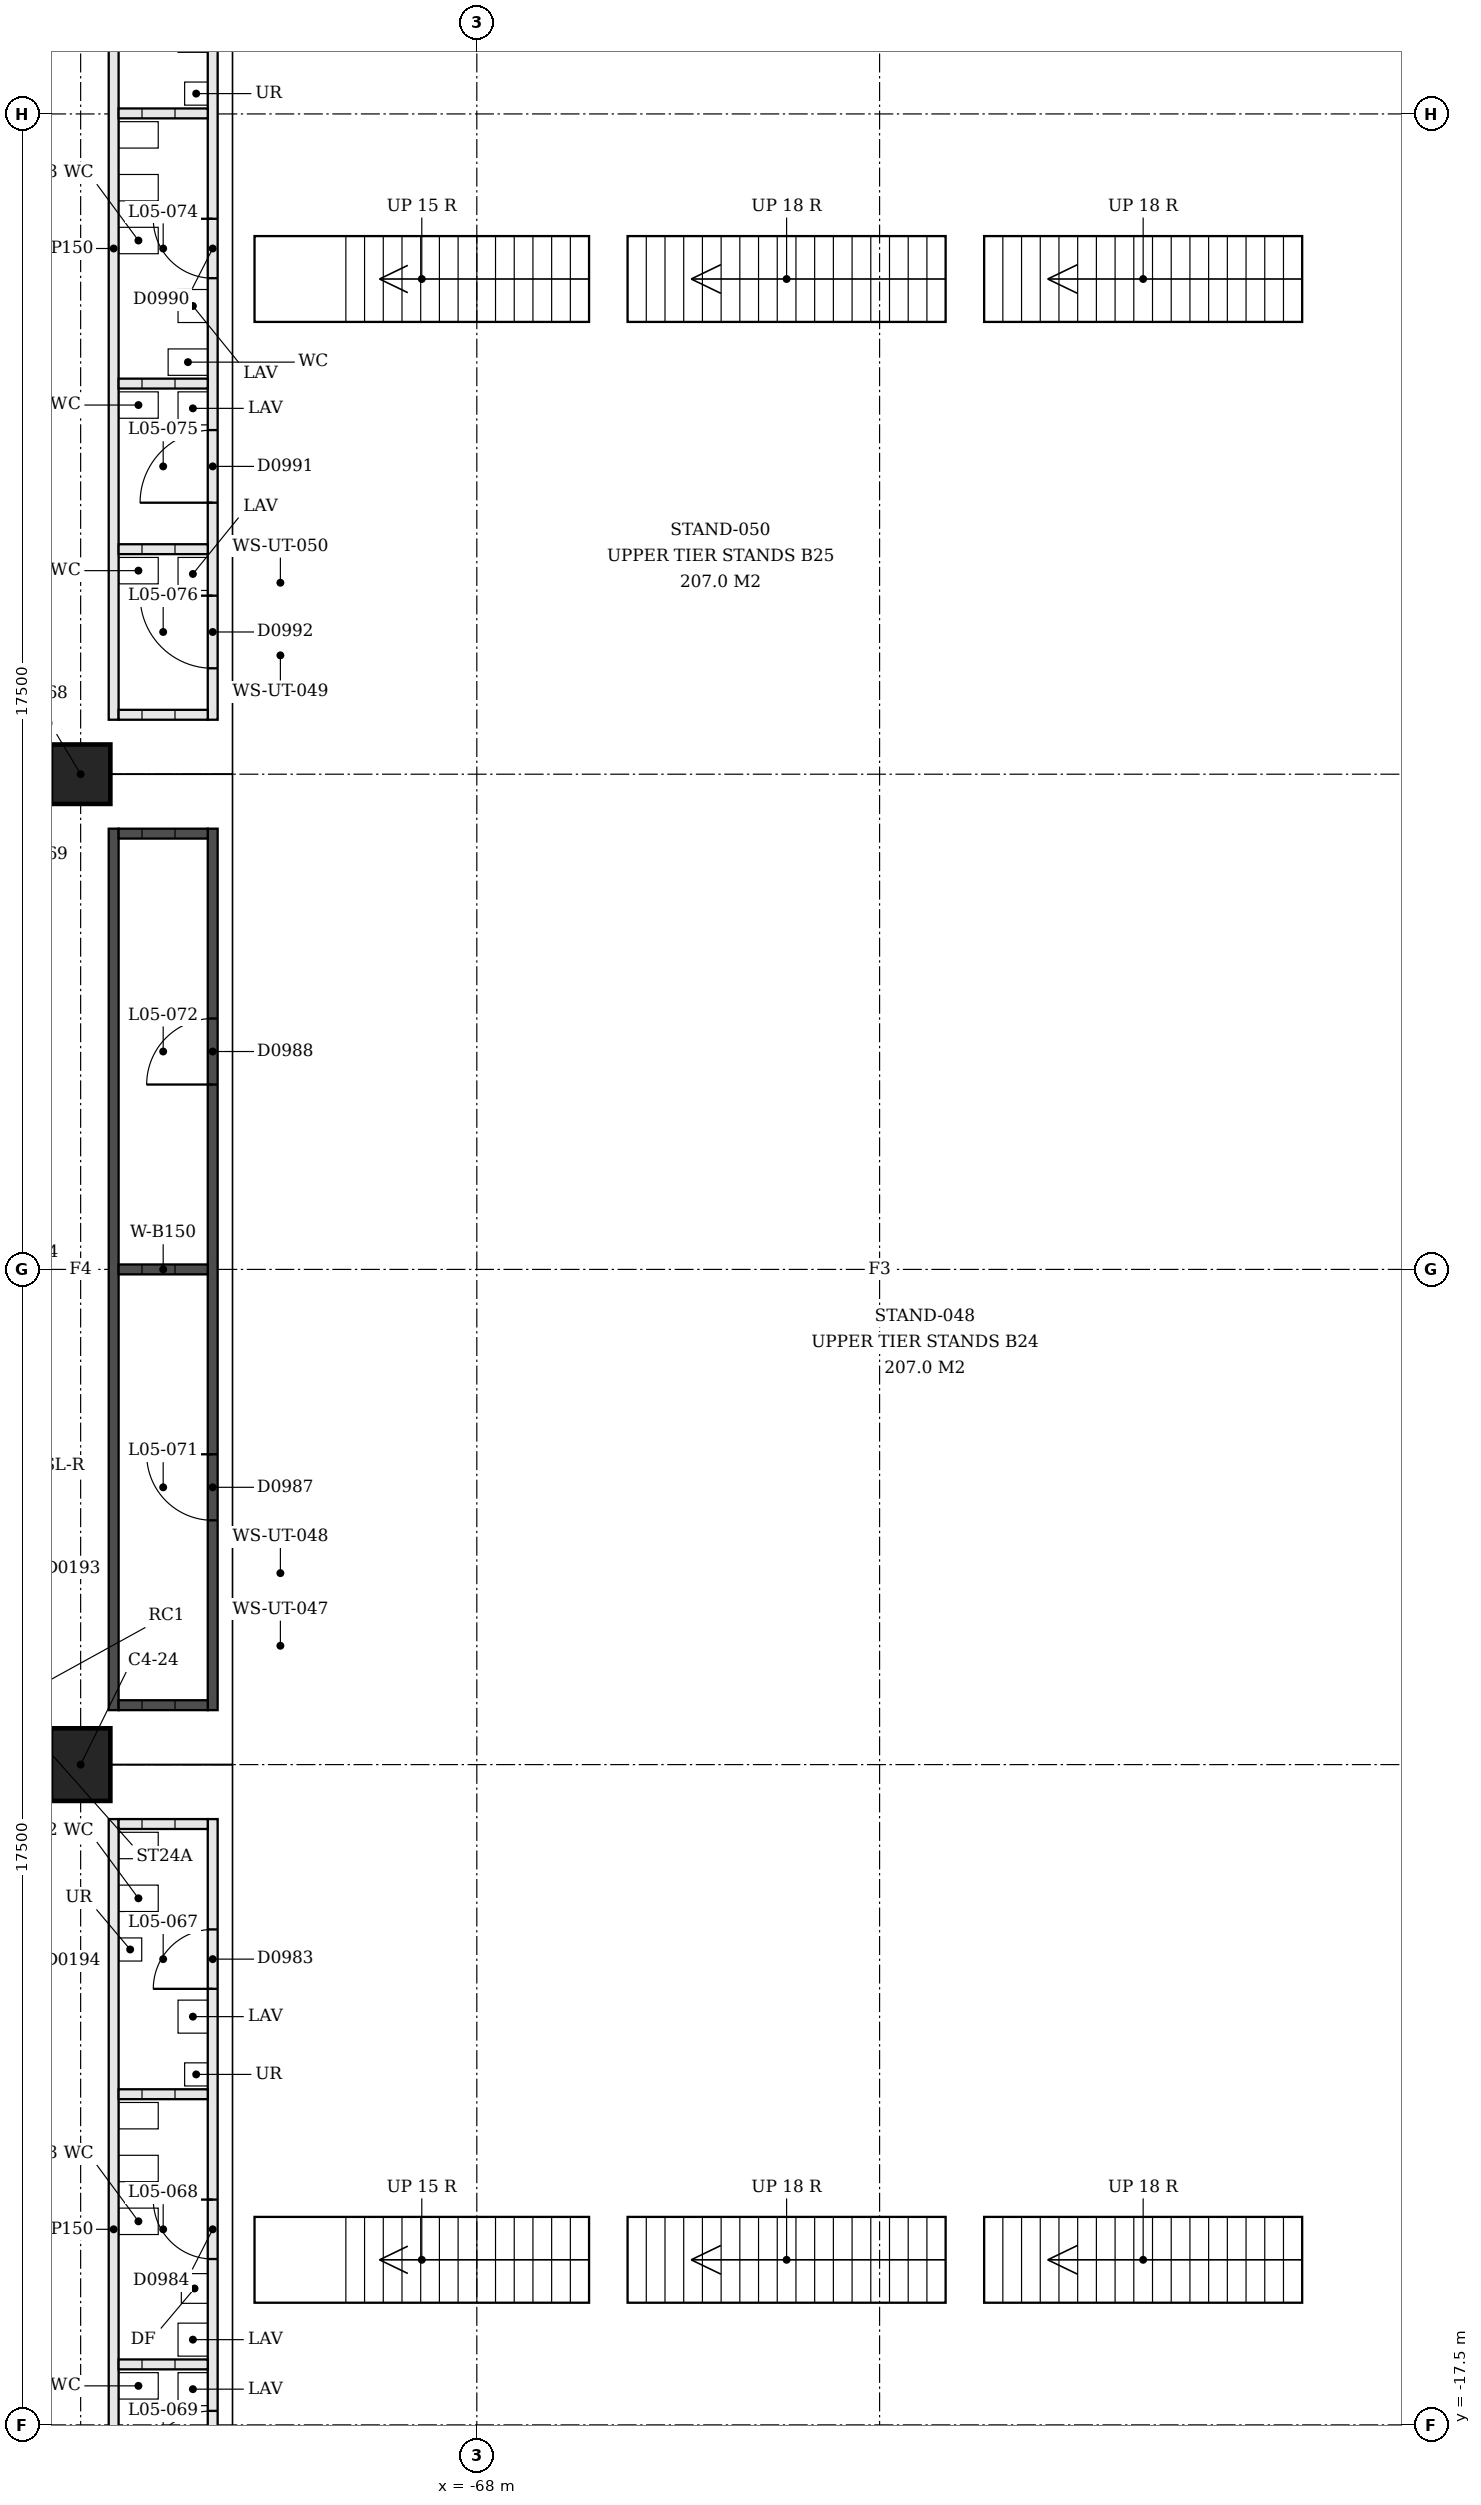
"""IFC4 building model, lengths in metres.
Left out: names, types, materials, properties, quantities, classifications, styles, units other than length and angle.
Written with IfcOpenShell. Run it as: python <this file> out.ifc"""

import sys

from ifc_helpers import new_model, si_unit, direction, frame, frame_2d, origin, origin_2d, place, context, subcontext, project, spatial, rectangle, extrude, element, fill, save


model = new_model("IFC4")
c1 = context("Model", 3, precision=1e-05, world=origin(), true_north=direction((0.0, 1.0)))
c2 = subcontext(c1, "Body", "Model", "MODEL_VIEW")
j1 = project(units=[si_unit("LENGTHUNIT", "METRE"), si_unit("PLANEANGLEUNIT", "RADIAN")], contexts=[c1])
p1 = place(None, origin())
s1 = spatial("IfcSite", under=j1, at=p1, CompositionType="ELEMENT")
p2 = place(p1, origin())
s2 = spatial("IfcBuilding", under=s1, at=p2, CompositionType="ELEMENT")
p3 = place(p2, frame((0.0, 0.0, 22.5)))
s3 = spatial("IfcBuildingStorey", under=s2, at=p3, CompositionType="ELEMENT", Elevation=22.5)
p4 = place(p3, frame((-74.0, -7.5, 0.0), z_axis=(0.0, 0.0, 1.0), x_axis=(0.0, -1.0, 0.0)))
e1 = element("IfcColumn", 1, at=p4, inside=s3, PredefinedType="COLUMN", context=c2, shape_type="SweptSolid", body=[
    extrude(rectangle(XDim=1.1, YDim=0.9, at=origin_2d()), origin(), (0.0, 0.0, 1.0), 6.5),
])
p5 = place(p3, frame((-74.0, 7.5, 0.0), z_axis=(0.0, 0.0, 1.0), x_axis=(0.0, -1.0, 0.0)))
e2 = element("IfcColumn", 2, at=p5, inside=s3, PredefinedType="COLUMN", context=c2, shape_type="SweptSolid", body=[
    extrude(rectangle(XDim=0.9, YDim=0.9, at=origin_2d()), origin(), (0.0, 0.0, 1.0), 6.5),
])
p6 = place(p3, frame((-72.0, -8.325, 0.0), z_axis=(0.0, 0.0, 1.0), x_axis=(0.0, -1.0, 0.0)))
e3 = element("IfcWall", 3, at=p6, inside=s3, PredefinedType="PARTITIONING", context=c2, shape_type="SweptSolid", body=[
    extrude(rectangle(XDim=13.35, YDim=0.15, at=frame_2d((6.675, 0.0))), origin(), (0.0, 0.0, 1.0), 3.0),
])
p7 = place(p6, frame((1.671, 0.0, 0.0)))
e4 = element("IfcOpeningElement", 4, at=p7, cuts=e3, PredefinedType="OPENING", context=c2, shape_type="SweptSolid", body=[
    extrude(rectangle(XDim=0.9, YDim=2.1, at=frame_2d((0.45, 1.05))), frame((0.0, 0.075, 0.0), z_axis=(0.0, -1.0, 0.0), x_axis=(1.0, 0.0, 0.0)), (0.0, 0.0, 1.0), 0.15),
])
p8 = place(p6, frame((5.763, 0.0, 0.0)))
e5 = element("IfcOpeningElement", 5, at=p8, cuts=e3, PredefinedType="OPENING", context=c2, shape_type="SweptSolid", body=[
    extrude(rectangle(XDim=0.9, YDim=2.1, at=frame_2d((0.45, 1.05))), frame((0.0, 0.075, 0.0), z_axis=(0.0, -1.0, 0.0), x_axis=(1.0, 0.0, 0.0)), (0.0, 0.0, 1.0), 0.15),
])
p9 = place(p6, frame((8.963, 0.0, 0.0)))
e6 = element("IfcOpeningElement", 6, at=p9, cuts=e3, PredefinedType="OPENING", context=c2, shape_type="SweptSolid", body=[
    extrude(rectangle(XDim=1.1, YDim=2.1, at=frame_2d((0.55, 1.05))), frame((0.0, 0.075, 0.0), z_axis=(0.0, -1.0, 0.0), x_axis=(1.0, 0.0, 0.0)), (0.0, 0.0, 1.0), 0.15),
])
p10 = place(p6, frame((11.471, 0.0, 0.0)))
e7 = element("IfcOpeningElement", 7, at=p10, cuts=e3, PredefinedType="OPENING", context=c2, shape_type="SweptSolid", body=[
    extrude(rectangle(XDim=1.1, YDim=2.1, at=frame_2d((0.55, 1.05))), frame((0.0, 0.075, 0.0), z_axis=(0.0, -1.0, 0.0), x_axis=(1.0, 0.0, 0.0)), (0.0, 0.0, 1.0), 0.15),
])
p11 = place(p3, frame((-73.5, -8.325, 0.0), z_axis=(0.0, 0.0, 1.0), x_axis=(0.0, -1.0, 0.0)))
e8 = element("IfcWall", 8, at=p11, inside=s3, PredefinedType="PARTITIONING", context=c2, shape_type="SweptSolid", body=[
    extrude(rectangle(XDim=13.35, YDim=0.15, at=frame_2d((6.675, 0.0))), origin(), (0.0, 0.0, 1.0), 3.0),
])
for number, where, z_axis, x_axis in (
    (9, (-72.075, -8.4, 0.0), (0.0, 0.0, 1.0), (-1.0, 0.0, 0.0)),
    (10, (-72.075, -12.492, 0.0), (0.0, 0.0, 1.0), (-1.0, 0.0, 0.0)),
    (11, (-72.075, -16.584, 0.0), (0.0, 0.0, 1.0), (-1.0, 0.0, 0.0)),
):
    element("IfcWall", number, at=place(p3, frame(where, z_axis=z_axis, x_axis=x_axis)), inside=s3, PredefinedType="PARTITIONING", context=c2, shape_type="SweptSolid", body=[
        extrude(rectangle(XDim=1.35, YDim=0.15, at=frame_2d((0.675, 0.0))), origin(), (0.0, 0.0, 1.0), 3.0),
    ])
p12 = place(p3, frame((-72.0, -6.675, 0.0), z_axis=(0.0, 0.0, 1.0), x_axis=(0.0, 1.0, 0.0)))
e12 = element("IfcWall", 12, at=p12, inside=s3, PredefinedType="SOLIDWALL", context=c2, shape_type="SweptSolid", body=[
    extrude(rectangle(XDim=13.35, YDim=0.15, at=frame_2d((6.675, 0.0))), origin(), (0.0, 0.0, 1.0), 3.0),
])
p13 = place(p12, frame((2.875, 0.0, 0.0)))
e13 = element("IfcOpeningElement", 13, at=p13, cuts=e12, PredefinedType="OPENING", context=c2, shape_type="SweptSolid", body=[
    extrude(rectangle(XDim=1.0, YDim=2.1, at=frame_2d((0.5, 1.05))), frame((0.0, 0.075, 0.0), z_axis=(0.0, -1.0, 0.0), x_axis=(1.0, 0.0, 0.0)), (0.0, 0.0, 1.0), 0.15),
])
p14 = place(p12, frame((9.475, 0.0, 0.0)))
e14 = element("IfcOpeningElement", 14, at=p14, cuts=e12, PredefinedType="OPENING", context=c2, shape_type="SweptSolid", body=[
    extrude(rectangle(XDim=1.0, YDim=2.1, at=frame_2d((0.5, 1.05))), frame((0.0, 0.075, 0.0), z_axis=(0.0, -1.0, 0.0), x_axis=(1.0, 0.0, 0.0)), (0.0, 0.0, 1.0), 0.15),
])
p15 = place(p3, frame((-73.5, -6.675, 0.0), z_axis=(0.0, 0.0, 1.0), x_axis=(0.0, 1.0, 0.0)))
e15 = element("IfcWall", 15, at=p15, inside=s3, PredefinedType="SOLIDWALL", context=c2, shape_type="SweptSolid", body=[
    extrude(rectangle(XDim=13.35, YDim=0.15, at=frame_2d((6.675, 0.0))), origin(), (0.0, 0.0, 1.0), 3.0),
])
for number, where, z_axis, x_axis in (
    (16, (-72.075, -6.6, 0.0), (0.0, 0.0, 1.0), (-1.0, 0.0, 0.0)),
    (17, (-72.075, 0.0, 0.0), (0.0, 0.0, 1.0), (-1.0, 0.0, 0.0)),
    (18, (-72.075, 6.6, 0.0), (0.0, 0.0, 1.0), (-1.0, 0.0, 0.0)),
):
    element("IfcWall", number, at=place(p3, frame(where, z_axis=z_axis, x_axis=x_axis)), inside=s3, PredefinedType="SOLIDWALL", context=c2, shape_type="SweptSolid", body=[
        extrude(rectangle(XDim=1.35, YDim=0.15, at=frame_2d((0.675, 0.0))), origin(), (0.0, 0.0, 1.0), 3.0),
    ])
p16 = place(p3, frame((-72.0, 21.675, 0.0), z_axis=(0.0, 0.0, 1.0), x_axis=(0.0, -1.0, 0.0)))
e19 = element("IfcWall", 19, at=p16, inside=s3, PredefinedType="PARTITIONING", context=c2, shape_type="SweptSolid", body=[
    extrude(rectangle(XDim=13.35, YDim=0.15, at=frame_2d((6.675, 0.0))), origin(), (0.0, 0.0, 1.0), 3.0),
])
p17 = place(p16, frame((1.671, 0.0, 0.0)))
e20 = element("IfcOpeningElement", 20, at=p17, cuts=e19, PredefinedType="OPENING", context=c2, shape_type="SweptSolid", body=[
    extrude(rectangle(XDim=0.9, YDim=2.1, at=frame_2d((0.45, 1.05))), frame((0.0, 0.075, 0.0), z_axis=(0.0, -1.0, 0.0), x_axis=(1.0, 0.0, 0.0)), (0.0, 0.0, 1.0), 0.15),
])
p18 = place(p16, frame((5.763, 0.0, 0.0)))
e21 = element("IfcOpeningElement", 21, at=p18, cuts=e19, PredefinedType="OPENING", context=c2, shape_type="SweptSolid", body=[
    extrude(rectangle(XDim=0.9, YDim=2.1, at=frame_2d((0.45, 1.05))), frame((0.0, 0.075, 0.0), z_axis=(0.0, -1.0, 0.0), x_axis=(1.0, 0.0, 0.0)), (0.0, 0.0, 1.0), 0.15),
])
p19 = place(p16, frame((8.963, 0.0, 0.0)))
e22 = element("IfcOpeningElement", 22, at=p19, cuts=e19, PredefinedType="OPENING", context=c2, shape_type="SweptSolid", body=[
    extrude(rectangle(XDim=1.1, YDim=2.1, at=frame_2d((0.55, 1.05))), frame((0.0, 0.075, 0.0), z_axis=(0.0, -1.0, 0.0), x_axis=(1.0, 0.0, 0.0)), (0.0, 0.0, 1.0), 0.15),
])
p20 = place(p16, frame((11.471, 0.0, 0.0)))
e23 = element("IfcOpeningElement", 23, at=p20, cuts=e19, PredefinedType="OPENING", context=c2, shape_type="SweptSolid", body=[
    extrude(rectangle(XDim=1.1, YDim=2.1, at=frame_2d((0.55, 1.05))), frame((0.0, 0.075, 0.0), z_axis=(0.0, -1.0, 0.0), x_axis=(1.0, 0.0, 0.0)), (0.0, 0.0, 1.0), 0.15),
])
p21 = place(p3, frame((-73.5, 21.675, 0.0), z_axis=(0.0, 0.0, 1.0), x_axis=(0.0, -1.0, 0.0)))
e24 = element("IfcWall", 24, at=p21, inside=s3, PredefinedType="PARTITIONING", context=c2, shape_type="SweptSolid", body=[
    extrude(rectangle(XDim=13.35, YDim=0.15, at=frame_2d((6.675, 0.0))), origin(), (0.0, 0.0, 1.0), 3.0),
])
for number, where, z_axis, x_axis in (
    (25, (-72.075, 17.508, 0.0), (0.0, 0.0, 1.0), (-1.0, 0.0, 0.0)),
    (26, (-72.075, 13.416, 0.0), (0.0, 0.0, 1.0), (-1.0, 0.0, 0.0)),
    (27, (-72.075, 10.908, 0.0), (0.0, 0.0, 1.0), (-1.0, 0.0, 0.0)),
    (28, (-72.075, 8.4, 0.0), (0.0, 0.0, 1.0), (-1.0, 0.0, 0.0)),
):
    element("IfcWall", number, at=place(p3, frame(where, z_axis=z_axis, x_axis=x_axis)), inside=s3, PredefinedType="PARTITIONING", context=c2, shape_type="SweptSolid", body=[
        extrude(rectangle(XDim=1.35, YDim=0.15, at=frame_2d((0.675, 0.0))), origin(), (0.0, 0.0, 1.0), 3.0),
    ])
p22 = place(p7, origin())
e29 = element("IfcDoor", 29, at=p22, inside=s3, OperationType="SINGLE_SWING_RIGHT", PredefinedType="DOOR", context=c2, shape_type="SweptSolid", body=[
    extrude(rectangle(XDim=0.9, YDim=2.1, at=frame_2d((0.45, 1.05))), frame((0.0, 0.025, 0.0), z_axis=(0.0, -1.0, 0.0), x_axis=(1.0, 0.0, 0.0)), (0.0, 0.0, 1.0), 0.05),
])
fill(e4, e29)
p23 = place(p8, origin())
e30 = element("IfcDoor", 30, at=p23, inside=s3, OperationType="SINGLE_SWING_LEFT", PredefinedType="DOOR", context=c2, shape_type="SweptSolid", body=[
    extrude(rectangle(XDim=0.9, YDim=2.1, at=frame_2d((0.45, 1.05))), frame((0.0, 0.025, 0.0), z_axis=(0.0, -1.0, 0.0), x_axis=(1.0, 0.0, 0.0)), (0.0, 0.0, 1.0), 0.05),
])
fill(e5, e30)
p24 = place(p9, origin())
e31 = element("IfcDoor", 31, at=p24, inside=s3, OperationType="SINGLE_SWING_RIGHT", PredefinedType="DOOR", context=c2, shape_type="SweptSolid", body=[
    extrude(rectangle(XDim=1.1, YDim=2.1, at=frame_2d((0.55, 1.05))), frame((0.0, 0.025, 0.0), z_axis=(0.0, -1.0, 0.0), x_axis=(1.0, 0.0, 0.0)), (0.0, 0.0, 1.0), 0.05),
])
fill(e6, e31)
p25 = place(p13, origin())
e32 = element("IfcDoor", 32, at=p25, inside=s3, OperationType="SINGLE_SWING_LEFT", PredefinedType="DOOR", context=c2, shape_type="SweptSolid", body=[
    extrude(rectangle(XDim=1.0, YDim=2.1, at=frame_2d((0.5, 1.05))), frame((0.0, 0.025, 0.0), z_axis=(0.0, -1.0, 0.0), x_axis=(1.0, 0.0, 0.0)), (0.0, 0.0, 1.0), 0.05),
])
fill(e13, e32)
p26 = place(p14, origin())
e33 = element("IfcDoor", 33, at=p26, inside=s3, OperationType="SINGLE_SWING_RIGHT", PredefinedType="DOOR", context=c2, shape_type="SweptSolid", body=[
    extrude(rectangle(XDim=1.0, YDim=2.1, at=frame_2d((0.5, 1.05))), frame((0.0, 0.025, 0.0), z_axis=(0.0, -1.0, 0.0), x_axis=(1.0, 0.0, 0.0)), (0.0, 0.0, 1.0), 0.05),
])
fill(e14, e33)
p27 = place(p18, origin())
e34 = element("IfcDoor", 34, at=p27, inside=s3, OperationType="SINGLE_SWING_LEFT", PredefinedType="DOOR", context=c2, shape_type="SweptSolid", body=[
    extrude(rectangle(XDim=0.9, YDim=2.1, at=frame_2d((0.45, 1.05))), frame((0.0, 0.025, 0.0), z_axis=(0.0, -1.0, 0.0), x_axis=(1.0, 0.0, 0.0)), (0.0, 0.0, 1.0), 0.05),
])
fill(e21, e34)
p28 = place(p19, origin())
e35 = element("IfcDoor", 35, at=p28, inside=s3, OperationType="SINGLE_SWING_RIGHT", PredefinedType="DOOR", context=c2, shape_type="SweptSolid", body=[
    extrude(rectangle(XDim=1.1, YDim=2.1, at=frame_2d((0.55, 1.05))), frame((0.0, 0.025, 0.0), z_axis=(0.0, -1.0, 0.0), x_axis=(1.0, 0.0, 0.0)), (0.0, 0.0, 1.0), 0.05),
])
fill(e22, e35)
p29 = place(p20, origin())
e36 = element("IfcDoor", 36, at=p29, inside=s3, OperationType="SINGLE_SWING_LEFT", PredefinedType="DOOR", context=c2, shape_type="SweptSolid", body=[
    extrude(rectangle(XDim=1.1, YDim=2.1, at=frame_2d((0.55, 1.05))), frame((0.0, 0.025, 0.0), z_axis=(0.0, -1.0, 0.0), x_axis=(1.0, 0.0, 0.0)), (0.0, 0.0, 1.0), 0.05),
])
fill(e23, e36)
save(model, sys.argv[1])
